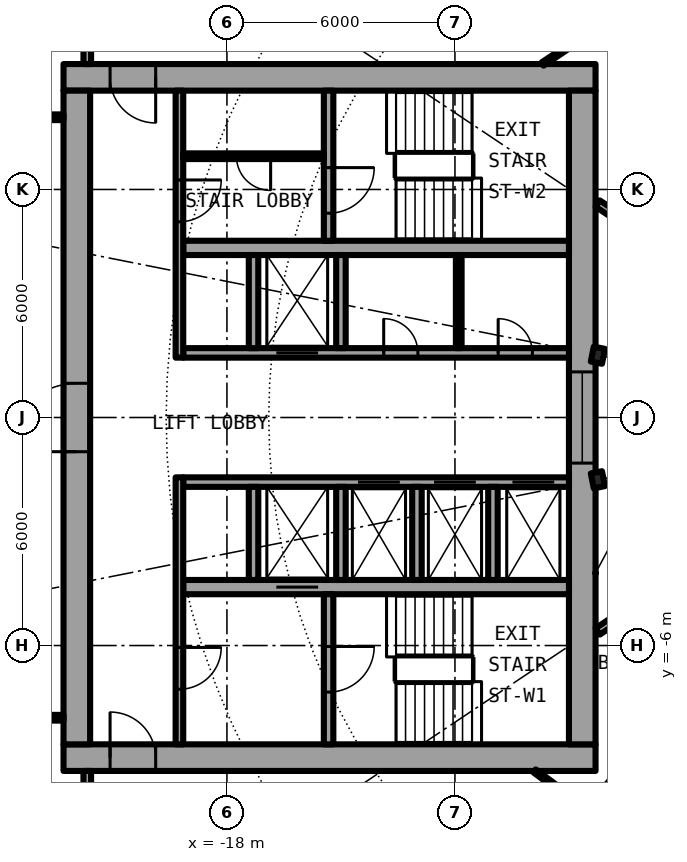
"""IFC4 building model, lengths in metres.
Left out: names, types, materials, properties, quantities, classifications, styles, units other than length and angle.
Written with IfcOpenShell. Run it as: python <this file> out.ifc"""

import sys

from ifc_helpers import new_model, si_unit, direction, frame, frame_2d, origin, origin_2d, place, context, subcontext, project, spatial, rectangle, i_section, extrude, element, fill, save


model = new_model("IFC4")
c1 = context("Model", 3, precision=1e-05, world=origin(), true_north=direction((0.0, 1.0)))
c2 = subcontext(c1, "Body", "Model", "MODEL_VIEW")
j1 = project(units=[si_unit("LENGTHUNIT", "METRE"), si_unit("PLANEANGLEUNIT", "RADIAN")], contexts=[c1])
p1 = place(None, origin())
s1 = spatial("IfcSite", under=j1, at=p1, CompositionType="ELEMENT")
p2 = place(p1, origin())
s2 = spatial("IfcBuilding", under=s1, at=p2, CompositionType="ELEMENT")
p3 = place(p2, frame((0.0, 0.0, 63.6)))
s3 = spatial("IfcBuildingStorey", under=s2, at=p3, CompositionType="ELEMENT", Elevation=63.6)
for number, where, z_axis, x_axis in (
    (1, (-8.239, 1.639, 0.0), (0.0, 0.0, 1.0), (-0.981, 0.195, 0.0)),
    (2, (-8.239, -1.639, 0.0), (0.0, 0.0, 1.0), (-0.981, -0.195, 0.0)),
):
    element("IfcColumn", number, at=place(p3, frame(where, z_axis=z_axis, x_axis=x_axis)), inside=s3, PredefinedType="COLUMN", context=c2, shape_type="SweptSolid", body=[
        extrude(i_section(OverallWidth=0.3, OverallDepth=0.4, WebThickness=0.013, FlangeThickness=0.024, FilletRadius=0.027, at=origin_2d()), origin(), (0.0, 0.0, 1.0), 3.05),
    ])
p4 = place(p3, frame((-22.3, -8.95, 0.0), z_axis=(0.0, 0.0, 1.0), x_axis=(1.0, 0.0, 0.0)))
e3 = element("IfcWall", 3, at=p4, inside=s3, PredefinedType="SHEAR", context=c2, shape_type="SweptSolid", body=[
    extrude(rectangle(XDim=14.0, YDim=0.7, at=frame_2d((7.0, 0.0))), origin(), (0.0, 0.0, 1.0), 3.05),
])
p5 = place(p4, frame((1.225, 0.0, 0.0)))
e4 = element("IfcOpeningElement", 4, at=p5, cuts=e3, PredefinedType="OPENING", context=c2, shape_type="SweptSolid", body=[
    extrude(rectangle(XDim=1.2, YDim=2.3, at=frame_2d((0.6, 1.15))), frame((0.0, 0.36, 0.0), z_axis=(0.0, -1.0, 0.0), x_axis=(1.0, 0.0, 0.0)), (0.0, 0.0, 1.0), 0.72),
])
p6 = place(p3, frame((-8.3, 8.95, 0.0), z_axis=(0.0, 0.0, 1.0), x_axis=(-1.0, 0.0, 0.0)))
e5 = element("IfcWall", 5, at=p6, inside=s3, PredefinedType="SHEAR", context=c2, shape_type="SweptSolid", body=[
    extrude(rectangle(XDim=14.0, YDim=0.7, at=frame_2d((7.0, 0.0))), origin(), (0.0, 0.0, 1.0), 3.05),
])
p7 = place(p6, frame((11.575, 0.0, 0.0)))
e6 = element("IfcOpeningElement", 6, at=p7, cuts=e5, PredefinedType="OPENING", context=c2, shape_type="SweptSolid", body=[
    extrude(rectangle(XDim=1.2, YDim=2.3, at=frame_2d((0.6, 1.15))), frame((0.0, 0.36, 0.0), z_axis=(0.0, -1.0, 0.0), x_axis=(1.0, 0.0, 0.0)), (0.0, 0.0, 1.0), 0.72),
])
p8 = place(p3, frame((-21.95, -8.6, 0.0), z_axis=(0.0, 0.0, 1.0), x_axis=(0.0, 1.0, 0.0)))
e7 = element("IfcWall", 7, at=p8, inside=s3, PredefinedType="SHEAR", context=c2, shape_type="SweptSolid", body=[
    extrude(rectangle(XDim=17.2, YDim=0.7, at=frame_2d((8.6, 0.0))), origin(), (0.0, 0.0, 1.0), 3.05),
])
p9 = place(p8, frame((7.7, 0.0, 0.0)))
e8 = element("IfcOpeningElement", 8, at=p9, cuts=e7, PredefinedType="OPENING", context=c2, shape_type="SweptSolid", body=[
    extrude(rectangle(XDim=1.8, YDim=2.3, at=frame_2d((0.9, 1.15))), frame((0.0, 0.36, 0.0), z_axis=(0.0, -1.0, 0.0), x_axis=(1.0, 0.0, 0.0)), (0.0, 0.0, 1.0), 0.72),
])
p10 = place(p3, frame((-8.65, 8.6, 0.0), z_axis=(0.0, 0.0, 1.0), x_axis=(0.0, -1.0, 0.0)))
e9 = element("IfcWall", 9, at=p10, inside=s3, PredefinedType="SHEAR", context=c2, shape_type="SweptSolid", body=[
    extrude(rectangle(XDim=17.2, YDim=0.7, at=frame_2d((8.6, 0.0))), origin(), (0.0, 0.0, 1.0), 3.05),
])
p11 = place(p10, frame((7.4, 0.0, 0.1)))
e10 = element("IfcOpeningElement", 10, at=p11, cuts=e9, PredefinedType="OPENING", context=c2, shape_type="SweptSolid", body=[
    extrude(rectangle(XDim=2.4, YDim=2.2, at=frame_2d((1.2, 1.1))), frame((0.0, 0.36, 0.0), z_axis=(0.0, -1.0, 0.0), x_axis=(1.0, 0.0, 0.0)), (0.0, 0.0, 1.0), 0.72),
])
p12 = place(p3, frame((-9.0, -1.7, 0.0), z_axis=(0.0, 0.0, 1.0), x_axis=(-1.0, 0.0, 0.0)))
e11 = element("IfcWall", 11, at=p12, inside=s3, PredefinedType="SHEAR", context=c2, shape_type="SweptSolid", body=[
    extrude(rectangle(XDim=10.15, YDim=0.25, at=frame_2d((5.075, 0.0))), origin(), (0.0, 0.0, 1.0), 3.05),
])
p13 = place(p12, frame((0.387, 0.0, 0.0)))
e12 = element("IfcOpeningElement", 12, at=p13, cuts=e11, PredefinedType="OPENING", context=c2, shape_type="SweptSolid", body=[
    extrude(rectangle(XDim=1.1, YDim=2.3, at=frame_2d((0.55, 1.15))), frame((0.0, 0.135, 0.0), z_axis=(0.0, -1.0, 0.0), x_axis=(1.0, 0.0, 0.0)), (0.0, 0.0, 1.0), 0.27),
])
p14 = place(p12, frame((2.45, 0.0, 0.0)))
e13 = element("IfcOpeningElement", 13, at=p14, cuts=e11, PredefinedType="OPENING", context=c2, shape_type="SweptSolid", body=[
    extrude(rectangle(XDim=1.1, YDim=2.3, at=frame_2d((0.55, 1.15))), frame((0.0, 0.135, 0.0), z_axis=(0.0, -1.0, 0.0), x_axis=(1.0, 0.0, 0.0)), (0.0, 0.0, 1.0), 0.27),
])
p15 = place(p12, frame((4.45, 0.0, 0.0)))
e14 = element("IfcOpeningElement", 14, at=p15, cuts=e11, PredefinedType="OPENING", context=c2, shape_type="SweptSolid", body=[
    extrude(rectangle(XDim=1.1, YDim=2.3, at=frame_2d((0.55, 1.15))), frame((0.0, 0.135, 0.0), z_axis=(0.0, -1.0, 0.0), x_axis=(1.0, 0.0, 0.0)), (0.0, 0.0, 1.0), 0.27),
])
p16 = place(p3, frame((-9.0, -4.462, 0.0), z_axis=(0.0, 0.0, 1.0), x_axis=(-1.0, 0.0, 0.0)))
e15 = element("IfcWall", 15, at=p16, inside=s3, PredefinedType="SHEAR", context=c2, shape_type="SweptSolid", body=[
    extrude(rectangle(XDim=10.15, YDim=0.375, at=frame_2d((5.075, 0.0))), origin(), (0.0, 0.0, 1.0), 3.05),
])
p17 = place(p16, frame((6.6, 0.0, 0.0)))
e16 = element("IfcOpeningElement", 16, at=p17, cuts=e15, PredefinedType="OPENING", context=c2, shape_type="SweptSolid", body=[
    extrude(rectangle(XDim=1.1, YDim=2.3, at=frame_2d((0.55, 1.15))), frame((0.0, 0.198, 0.0), z_axis=(0.0, -1.0, 0.0), x_axis=(1.0, 0.0, 0.0)), (0.0, 0.0, 1.0), 0.395),
])
p18 = place(p3, frame((-15.325, -4.65, 0.0), z_axis=(0.0, 0.0, 1.0), x_axis=(0.0, -1.0, 0.0)))
e17 = element("IfcWall", 17, at=p18, inside=s3, PredefinedType="SHEAR", context=c2, shape_type="SweptSolid", body=[
    extrude(rectangle(XDim=3.95, YDim=0.25, at=frame_2d((1.975, 0.0))), origin(), (0.0, 0.0, 1.0), 3.05),
])
p19 = place(p18, frame((1.375, 0.0, 0.0)))
e18 = element("IfcOpeningElement", 18, at=p19, cuts=e17, PredefinedType="OPENING", context=c2, shape_type="SweptSolid", body=[
    extrude(rectangle(XDim=1.2, YDim=2.3, at=frame_2d((0.6, 1.15))), frame((0.0, 0.135, 0.0), z_axis=(0.0, -1.0, 0.0), x_axis=(1.0, 0.0, 0.0)), (0.0, 0.0, 1.0), 0.27),
])
for number, where, z_axis, x_axis in (
    (19, (-15.0, -1.825, 0.0), (0.0, 0.0, 1.0), (0.0, -1.0, 0.0)),
    (20, (-17.3, -1.825, 0.0), (0.0, 0.0, 1.0), (0.0, -1.0, 0.0)),
):
    element("IfcWall", number, at=place(p3, frame(where, z_axis=z_axis, x_axis=x_axis)), inside=s3, PredefinedType="SOLIDWALL", context=c2, shape_type="SweptSolid", body=[
        extrude(rectangle(XDim=2.45, YDim=0.25, at=frame_2d((1.225, 0.0))), origin(), (0.0, 0.0, 1.0), 2.7),
    ])
p20 = place(p3, frame((-19.25, -1.575, 0.0), z_axis=(0.0, 0.0, 1.0), x_axis=(0.0, -1.0, 0.0)))
e21 = element("IfcWall", 21, at=p20, inside=s3, PredefinedType="SOLIDWALL", context=c2, shape_type="SweptSolid", body=[
    extrude(rectangle(XDim=7.025, YDim=0.2, at=frame_2d((3.513, 0.0))), origin(), (0.0, 0.0, 1.0), 2.7),
])
p21 = place(p20, frame((4.475, 0.0, 0.0)))
e22 = element("IfcOpeningElement", 22, at=p21, cuts=e21, PredefinedType="OPENING", context=c2, shape_type="SweptSolid", body=[
    extrude(rectangle(XDim=1.1, YDim=2.3, at=frame_2d((0.55, 1.15))), frame((0.0, 0.11, 0.0), z_axis=(0.0, -1.0, 0.0), x_axis=(1.0, 0.0, 0.0)), (0.0, 0.0, 1.0), 0.22),
])
p22 = place(p3, frame((-19.15, 1.7, 0.0), z_axis=(0.0, 0.0, 1.0), x_axis=(1.0, 0.0, 0.0)))
e23 = element("IfcWall", 23, at=p22, inside=s3, PredefinedType="SHEAR", context=c2, shape_type="SweptSolid", body=[
    extrude(rectangle(XDim=10.15, YDim=0.25, at=frame_2d((5.075, 0.0))), origin(), (0.0, 0.0, 1.0), 3.05),
])
p23 = place(p22, frame((2.45, 0.0, 0.0)))
e24 = element("IfcOpeningElement", 24, at=p23, cuts=e23, PredefinedType="OPENING", context=c2, shape_type="SweptSolid", body=[
    extrude(rectangle(XDim=1.1, YDim=2.3, at=frame_2d((0.55, 1.15))), frame((0.0, 0.135, 0.0), z_axis=(0.0, -1.0, 0.0), x_axis=(1.0, 0.0, 0.0)), (0.0, 0.0, 1.0), 0.27),
])
p24 = place(p22, frame((8.288, 0.0, 0.0)))
e25 = element("IfcOpeningElement", 25, at=p24, cuts=e23, PredefinedType="OPENING", context=c2, shape_type="SweptSolid", body=[
    extrude(rectangle(XDim=0.9, YDim=2.3, at=frame_2d((0.45, 1.15))), frame((0.0, 0.135, 0.0), z_axis=(0.0, -1.0, 0.0), x_axis=(1.0, 0.0, 0.0)), (0.0, 0.0, 1.0), 0.27),
])
p25 = place(p22, frame((5.275, 0.0, 0.0)))
e26 = element("IfcOpeningElement", 26, at=p25, cuts=e23, PredefinedType="OPENING", context=c2, shape_type="SweptSolid", body=[
    extrude(rectangle(XDim=0.9, YDim=2.3, at=frame_2d((0.45, 1.15))), frame((0.0, 0.135, 0.0), z_axis=(0.0, -1.0, 0.0), x_axis=(1.0, 0.0, 0.0)), (0.0, 0.0, 1.0), 0.27),
])
p26 = place(p3, frame((-9.0, 4.462, 0.0), z_axis=(0.0, 0.0, 1.0), x_axis=(-1.0, 0.0, 0.0)))
e27 = element("IfcWall", 27, at=p26, inside=s3, PredefinedType="SHEAR", context=c2, shape_type="SweptSolid", body=[
    extrude(rectangle(XDim=10.15, YDim=0.375, at=frame_2d((5.075, 0.0))), origin(), (0.0, 0.0, 1.0), 3.05),
])
p27 = place(p3, frame((-15.325, 8.6, 0.0), z_axis=(0.0, 0.0, 1.0), x_axis=(0.0, -1.0, 0.0)))
e28 = element("IfcWall", 28, at=p27, inside=s3, PredefinedType="SHEAR", context=c2, shape_type="SweptSolid", body=[
    extrude(rectangle(XDim=3.95, YDim=0.25, at=frame_2d((1.975, 0.0))), origin(), (0.0, 0.0, 1.0), 3.05),
])
p28 = place(p27, frame((2.025, 0.0, 0.0)))
e29 = element("IfcOpeningElement", 29, at=p28, cuts=e28, PredefinedType="OPENING", context=c2, shape_type="SweptSolid", body=[
    extrude(rectangle(XDim=1.2, YDim=2.3, at=frame_2d((0.6, 1.15))), frame((0.0, 0.135, 0.0), z_axis=(0.0, -1.0, 0.0), x_axis=(1.0, 0.0, 0.0)), (0.0, 0.0, 1.0), 0.27),
])
for number, where, z_axis, x_axis in (
    (30, (-15.0, 1.825, 0.0), (0.0, 0.0, 1.0), (0.0, 1.0, 0.0)),
    (31, (-17.3, 1.825, 0.0), (0.0, 0.0, 1.0), (0.0, 1.0, 0.0)),
):
    element("IfcWall", number, at=place(p3, frame(where, z_axis=z_axis, x_axis=x_axis)), inside=s3, PredefinedType="SOLIDWALL", context=c2, shape_type="SweptSolid", body=[
        extrude(rectangle(XDim=2.45, YDim=0.25, at=frame_2d((1.225, 0.0))), origin(), (0.0, 0.0, 1.0), 2.7),
    ])
p29 = place(p3, frame((-19.25, 8.6, 0.0), z_axis=(0.0, 0.0, 1.0), x_axis=(0.0, -1.0, 0.0)))
e32 = element("IfcWall", 32, at=p29, inside=s3, PredefinedType="SOLIDWALL", context=c2, shape_type="SweptSolid", body=[
    extrude(rectangle(XDim=7.025, YDim=0.2, at=frame_2d((3.513, 0.0))), origin(), (0.0, 0.0, 1.0), 2.7),
])
p30 = place(p29, frame((2.35, 0.0, 0.0)))
e33 = element("IfcOpeningElement", 33, at=p30, cuts=e32, PredefinedType="OPENING", context=c2, shape_type="SweptSolid", body=[
    extrude(rectangle(XDim=1.1, YDim=2.3, at=frame_2d((0.55, 1.15))), frame((0.0, 0.11, 0.0), z_axis=(0.0, -1.0, 0.0), x_axis=(1.0, 0.0, 0.0)), (0.0, 0.0, 1.0), 0.22),
])
for number, where, z_axis, x_axis in (
    (34, (-11.0, -1.825, 0.0), (0.0, 0.0, 1.0), (0.0, -1.0, 0.0)),
    (35, (-13.0, -1.825, 0.0), (0.0, 0.0, 1.0), (0.0, -1.0, 0.0)),
):
    element("IfcWall", number, at=place(p3, frame(where, z_axis=z_axis, x_axis=x_axis)), inside=s3, PredefinedType="SOLIDWALL", context=c2, shape_type="SweptSolid", body=[
        extrude(rectangle(XDim=2.45, YDim=0.25, at=frame_2d((1.225, 0.0))), origin(), (0.0, 0.0, 1.0), 2.7),
    ])
p31 = place(p3, frame((-11.9, 1.825, 0.0), z_axis=(0.0, 0.0, 1.0), x_axis=(0.0, 1.0, 0.0)))
e36 = element("IfcWall", 36, at=p31, inside=s3, PredefinedType="PARTITIONING", context=c2, shape_type="SweptSolid", body=[
    extrude(rectangle(XDim=2.45, YDim=0.15, at=frame_2d((1.225, 0.0))), origin(), (0.0, 0.0, 1.0), 2.7),
])
p32 = place(p3, frame((-15.45, 6.875, 0.0), z_axis=(0.0, 0.0, 1.0), x_axis=(-1.0, 0.0, 0.0)))
e37 = element("IfcWall", 37, at=p32, inside=s3, PredefinedType="PARTITIONING", context=c2, shape_type="SweptSolid", body=[
    extrude(rectangle(XDim=3.7, YDim=0.15, at=frame_2d((1.85, 0.0))), origin(), (0.0, 0.0, 1.0), 2.7),
])
p33 = place(p32, frame((1.4, 0.0, 0.0)))
e38 = element("IfcOpeningElement", 38, at=p33, cuts=e37, PredefinedType="OPENING", context=c2, shape_type="SweptSolid", body=[
    extrude(rectangle(XDim=0.9, YDim=2.3, at=frame_2d((0.45, 1.15))), frame((0.0, 0.085, 0.0), z_axis=(0.0, -1.0, 0.0), x_axis=(1.0, 0.0, 0.0)), (0.0, 0.0, 1.0), 0.17),
])
for number, where, z_axis, x_axis in (
    (39, (-22.3, 7.9, 0.0), (0.0, 0.0, 1.0), (-1.0, 0.0, 0.0)),
    (40, (-22.3, -7.9, 0.0), (0.0, 0.0, 1.0), (-1.0, 0.0, 0.0)),
):
    element("IfcWall", number, at=place(p3, frame(where, z_axis=z_axis, x_axis=x_axis)), inside=s3, PredefinedType="PARTITIONING", context=c2, shape_type="SweptSolid", body=[
        extrude(rectangle(XDim=2.64, YDim=0.15, at=frame_2d((1.32, 0.0))), origin(), (0.0, 0.0, 1.0), 2.7),
    ])
p34 = place(p3, frame((-9.904, -9.3, 0.0), z_axis=(0.0, 0.0, 1.0), x_axis=(0.803135014325, -0.595797070121, 0.0)))
e41 = element("IfcWall", 41, at=p34, inside=s3, PredefinedType="PARTITIONING", context=c2, shape_type="SweptSolid", body=[
    extrude(rectangle(XDim=1.732, YDim=0.1, at=frame_2d((0.866, 0.0))), origin(), (0.0, 0.0, 1.0), 2.7),
])
p35 = place(p3, frame((-6.513, -4.472, 0.0), z_axis=(0.0, 0.0, 1.0), x_axis=(-0.831382204863, -0.555701025225, 0.0)))
e42 = element("IfcWall", 42, at=p35, inside=s3, PredefinedType="PARTITIONING", context=c2, shape_type="SweptSolid", body=[
    extrude(rectangle(XDim=2.082, YDim=0.2, at=frame_2d((1.041, 0.0))), origin(), (0.0, 0.0, 1.0), 2.7),
])
p36 = place(p3, frame((-10.132, -12.296, 0.0), z_axis=(0.0, 0.0, 1.0), x_axis=(0.636105207978, 0.771602335652, 0.0)))
e43 = element("IfcWall", 43, at=p36, inside=s3, PredefinedType="PARTITIONING", context=c2, shape_type="SweptSolid", body=[
    extrude(rectangle(XDim=8.213, YDim=0.1, at=frame_2d((4.106, 0.0))), origin(), (0.0, 0.0, 1.0), 2.7),
])
p37 = place(p36, frame((0.821, 0.0, 0.0)))
e44 = element("IfcOpeningElement", 44, at=p37, cuts=e43, PredefinedType="OPENING", context=c2, shape_type="SweptSolid", body=[
    extrude(rectangle(XDim=0.9, YDim=2.3, at=frame_2d((0.45, 1.15))), frame((0.0, 0.06, 0.0), z_axis=(0.0, -1.0, 0.0), x_axis=(1.0, 0.0, 0.0)), (0.0, 0.0, 1.0), 0.12),
])
p38 = place(p36, frame((4.929, 0.0, 0.0)))
e45 = element("IfcOpeningElement", 45, at=p38, cuts=e43, PredefinedType="OPENING", context=c2, shape_type="SweptSolid", body=[
    extrude(rectangle(XDim=0.9, YDim=2.3, at=frame_2d((0.45, 1.15))), frame((0.0, 0.06, 0.0), z_axis=(0.0, -1.0, 0.0), x_axis=(1.0, 0.0, 0.0)), (0.0, 0.0, 1.0), 0.12),
])
p39 = place(p3, frame((-6.513, 4.472, 0.0), z_axis=(0.0, 0.0, 1.0), x_axis=(-0.831382204863, 0.555701025225, 0.0)))
e46 = element("IfcWall", 46, at=p39, inside=s3, PredefinedType="PARTITIONING", context=c2, shape_type="SweptSolid", body=[
    extrude(rectangle(XDim=2.082, YDim=0.2, at=frame_2d((1.041, 0.0))), origin(), (0.0, 0.0, 1.0), 2.7),
])
p40 = place(p3, frame((-9.695, 9.3, 0.0), z_axis=(0.0, 0.0, 1.0), x_axis=(0.831369521678, 0.555720000022, 0.0)))
e47 = element("IfcWall", 47, at=p40, inside=s3, PredefinedType="PARTITIONING", context=c2, shape_type="SweptSolid", body=[
    extrude(rectangle(XDim=4.252, YDim=0.1, at=frame_2d((2.126, 0.0))), origin(), (0.0, 0.0, 1.0), 2.7),
])
for number, where, z_axis, x_axis in (
    (48, (-21.675, -10.95, 0.0), (0.0, 0.0, 1.0), (0.0, 1.0, 0.0)),
    (49, (-21.675, 9.3, 0.0), (0.0, 0.0, 1.0), (0.0, 1.0, 0.0)),
):
    element("IfcWall", number, at=place(p3, frame(where, z_axis=z_axis, x_axis=x_axis)), inside=s3, PredefinedType="PARTITIONING", context=c2, shape_type="SweptSolid", body=[
        extrude(rectangle(XDim=1.65, YDim=0.2, at=frame_2d((0.825, 0.0))), origin(), (0.0, 0.0, 1.0), 2.7),
    ])
p41 = place(p13, origin())
e50 = element("IfcDoor", 50, at=p41, inside=s3, OperationType="DOUBLE_DOOR_SLIDING", PredefinedType="DOOR", context=c2, shape_type="SweptSolid", body=[
    extrude(rectangle(XDim=1.1, YDim=2.3, at=frame_2d((0.55, 1.15))), frame((0.0, 0.025, 0.0), z_axis=(0.0, -1.0, 0.0), x_axis=(1.0, 0.0, 0.0)), (0.0, 0.0, 1.0), 0.05),
])
fill(e12, e50)
p42 = place(p14, origin())
e51 = element("IfcDoor", 51, at=p42, inside=s3, OperationType="DOUBLE_DOOR_SLIDING", PredefinedType="DOOR", context=c2, shape_type="SweptSolid", body=[
    extrude(rectangle(XDim=1.1, YDim=2.3, at=frame_2d((0.55, 1.15))), frame((0.0, 0.025, 0.0), z_axis=(0.0, -1.0, 0.0), x_axis=(1.0, 0.0, 0.0)), (0.0, 0.0, 1.0), 0.05),
])
fill(e13, e51)
p43 = place(p15, origin())
e52 = element("IfcDoor", 52, at=p43, inside=s3, OperationType="DOUBLE_DOOR_SLIDING", PredefinedType="DOOR", context=c2, shape_type="SweptSolid", body=[
    extrude(rectangle(XDim=1.1, YDim=2.3, at=frame_2d((0.55, 1.15))), frame((0.0, 0.025, 0.0), z_axis=(0.0, -1.0, 0.0), x_axis=(1.0, 0.0, 0.0)), (0.0, 0.0, 1.0), 0.05),
])
fill(e14, e52)
p44 = place(p17, origin())
e53 = element("IfcDoor", 53, at=p44, inside=s3, OperationType="DOUBLE_DOOR_SLIDING", PredefinedType="DOOR", context=c2, shape_type="SweptSolid", body=[
    extrude(rectangle(XDim=1.1, YDim=2.3, at=frame_2d((0.55, 1.15))), frame((0.0, 0.025, 0.0), z_axis=(0.0, -1.0, 0.0), x_axis=(1.0, 0.0, 0.0)), (0.0, 0.0, 1.0), 0.05),
])
fill(e16, e53)
p45 = place(p23, origin())
e54 = element("IfcDoor", 54, at=p45, inside=s3, OperationType="DOUBLE_DOOR_SLIDING", PredefinedType="DOOR", context=c2, shape_type="SweptSolid", body=[
    extrude(rectangle(XDim=1.1, YDim=2.3, at=frame_2d((0.55, 1.15))), frame((0.0, 0.025, 0.0), z_axis=(0.0, -1.0, 0.0), x_axis=(1.0, 0.0, 0.0)), (0.0, 0.0, 1.0), 0.05),
])
fill(e24, e54)
p46 = place(p24, origin())
e55 = element("IfcDoor", 55, at=p46, inside=s3, OperationType="SINGLE_SWING_LEFT", PredefinedType="DOOR", context=c2, shape_type="SweptSolid", body=[
    extrude(rectangle(XDim=0.9, YDim=2.3, at=frame_2d((0.45, 1.15))), frame((0.0, 0.025, 0.0), z_axis=(0.0, -1.0, 0.0), x_axis=(1.0, 0.0, 0.0)), (0.0, 0.0, 1.0), 0.05),
])
fill(e25, e55)
p47 = place(p25, origin())
e56 = element("IfcDoor", 56, at=p47, inside=s3, OperationType="SINGLE_SWING_LEFT", PredefinedType="DOOR", context=c2, shape_type="SweptSolid", body=[
    extrude(rectangle(XDim=0.9, YDim=2.3, at=frame_2d((0.45, 1.15))), frame((0.0, 0.025, 0.0), z_axis=(0.0, -1.0, 0.0), x_axis=(1.0, 0.0, 0.0)), (0.0, 0.0, 1.0), 0.05),
])
fill(e26, e56)
p48 = place(p33, origin())
e57 = element("IfcDoor", 57, at=p48, inside=s3, OperationType="SINGLE_SWING_LEFT", PredefinedType="DOOR", context=c2, shape_type="SweptSolid", body=[
    extrude(rectangle(XDim=0.9, YDim=2.3, at=frame_2d((0.45, 1.15))), frame((0.0, 0.025, 0.0), z_axis=(0.0, -1.0, 0.0), x_axis=(1.0, 0.0, 0.0)), (0.0, 0.0, 1.0), 0.05),
])
fill(e38, e57)
p49 = place(p19, origin())
e58 = element("IfcDoor", 58, at=p49, inside=s3, OperationType="SINGLE_SWING_LEFT", PredefinedType="DOOR", context=c2, shape_type="SweptSolid", body=[
    extrude(rectangle(XDim=1.2, YDim=2.3, at=frame_2d((0.6, 1.15))), frame((0.0, 0.025, 0.0), z_axis=(0.0, -1.0, 0.0), x_axis=(1.0, 0.0, 0.0)), (0.0, 0.0, 1.0), 0.05),
])
fill(e18, e58)
p50 = place(p28, origin())
e59 = element("IfcDoor", 59, at=p50, inside=s3, OperationType="SINGLE_SWING_LEFT", PredefinedType="DOOR", context=c2, shape_type="SweptSolid", body=[
    extrude(rectangle(XDim=1.2, YDim=2.3, at=frame_2d((0.6, 1.15))), frame((0.0, 0.025, 0.0), z_axis=(0.0, -1.0, 0.0), x_axis=(1.0, 0.0, 0.0)), (0.0, 0.0, 1.0), 0.05),
])
fill(e29, e59)
p51 = place(p21, origin())
e60 = element("IfcDoor", 60, at=p51, inside=s3, OperationType="SINGLE_SWING_LEFT", PredefinedType="DOOR", context=c2, shape_type="SweptSolid", body=[
    extrude(rectangle(XDim=1.1, YDim=2.3, at=frame_2d((0.55, 1.15))), frame((0.0, 0.025, 0.0), z_axis=(0.0, -1.0, 0.0), x_axis=(1.0, 0.0, 0.0)), (0.0, 0.0, 1.0), 0.05),
])
fill(e22, e60)
p52 = place(p30, origin())
e61 = element("IfcDoor", 61, at=p52, inside=s3, OperationType="SINGLE_SWING_RIGHT", PredefinedType="DOOR", context=c2, shape_type="SweptSolid", body=[
    extrude(rectangle(XDim=1.1, YDim=2.3, at=frame_2d((0.55, 1.15))), frame((0.0, 0.025, 0.0), z_axis=(0.0, -1.0, 0.0), x_axis=(1.0, 0.0, 0.0)), (0.0, 0.0, 1.0), 0.05),
])
fill(e33, e61)
p53 = place(p5, origin())
e62 = element("IfcDoor", 62, at=p53, inside=s3, OperationType="SINGLE_SWING_RIGHT", PredefinedType="DOOR", context=c2, shape_type="SweptSolid", body=[
    extrude(rectangle(XDim=1.2, YDim=2.3, at=frame_2d((0.6, 1.15))), frame((0.0, 0.025, 0.0), z_axis=(0.0, -1.0, 0.0), x_axis=(1.0, 0.0, 0.0)), (0.0, 0.0, 1.0), 0.05),
])
fill(e4, e62)
p54 = place(p7, origin())
e63 = element("IfcDoor", 63, at=p54, inside=s3, OperationType="SINGLE_SWING_LEFT", PredefinedType="DOOR", context=c2, shape_type="SweptSolid", body=[
    extrude(rectangle(XDim=1.2, YDim=2.3, at=frame_2d((0.6, 1.15))), frame((0.0, 0.025, 0.0), z_axis=(0.0, -1.0, 0.0), x_axis=(1.0, 0.0, 0.0)), (0.0, 0.0, 1.0), 0.05),
])
fill(e6, e63)
p55 = place(p9, origin())
e64 = element("IfcDoor", 64, at=p55, inside=s3, OperationType="SINGLE_SWING_LEFT", PredefinedType="DOOR", context=c2, shape_type="SweptSolid", body=[
    extrude(rectangle(XDim=1.8, YDim=2.3, at=frame_2d((0.9, 1.15))), frame((0.0, 0.025, 0.0), z_axis=(0.0, -1.0, 0.0), x_axis=(1.0, 0.0, 0.0)), (0.0, 0.0, 1.0), 0.05),
])
fill(e8, e64)
p56 = place(p11, origin())
e65 = element("IfcWindow", 65, at=p56, inside=s3, PartitioningType="SINGLE_PANEL", PredefinedType="WINDOW", context=c2, shape_type="SweptSolid", body=[
    extrude(rectangle(XDim=2.4, YDim=2.2, at=frame_2d((1.2, 1.1))), frame((0.0, 0.03, 0.0), z_axis=(0.0, -1.0, 0.0), x_axis=(1.0, 0.0, 0.0)), (0.0, 0.0, 1.0), 0.06),
])
fill(e10, e65)
save(model, sys.argv[1])
